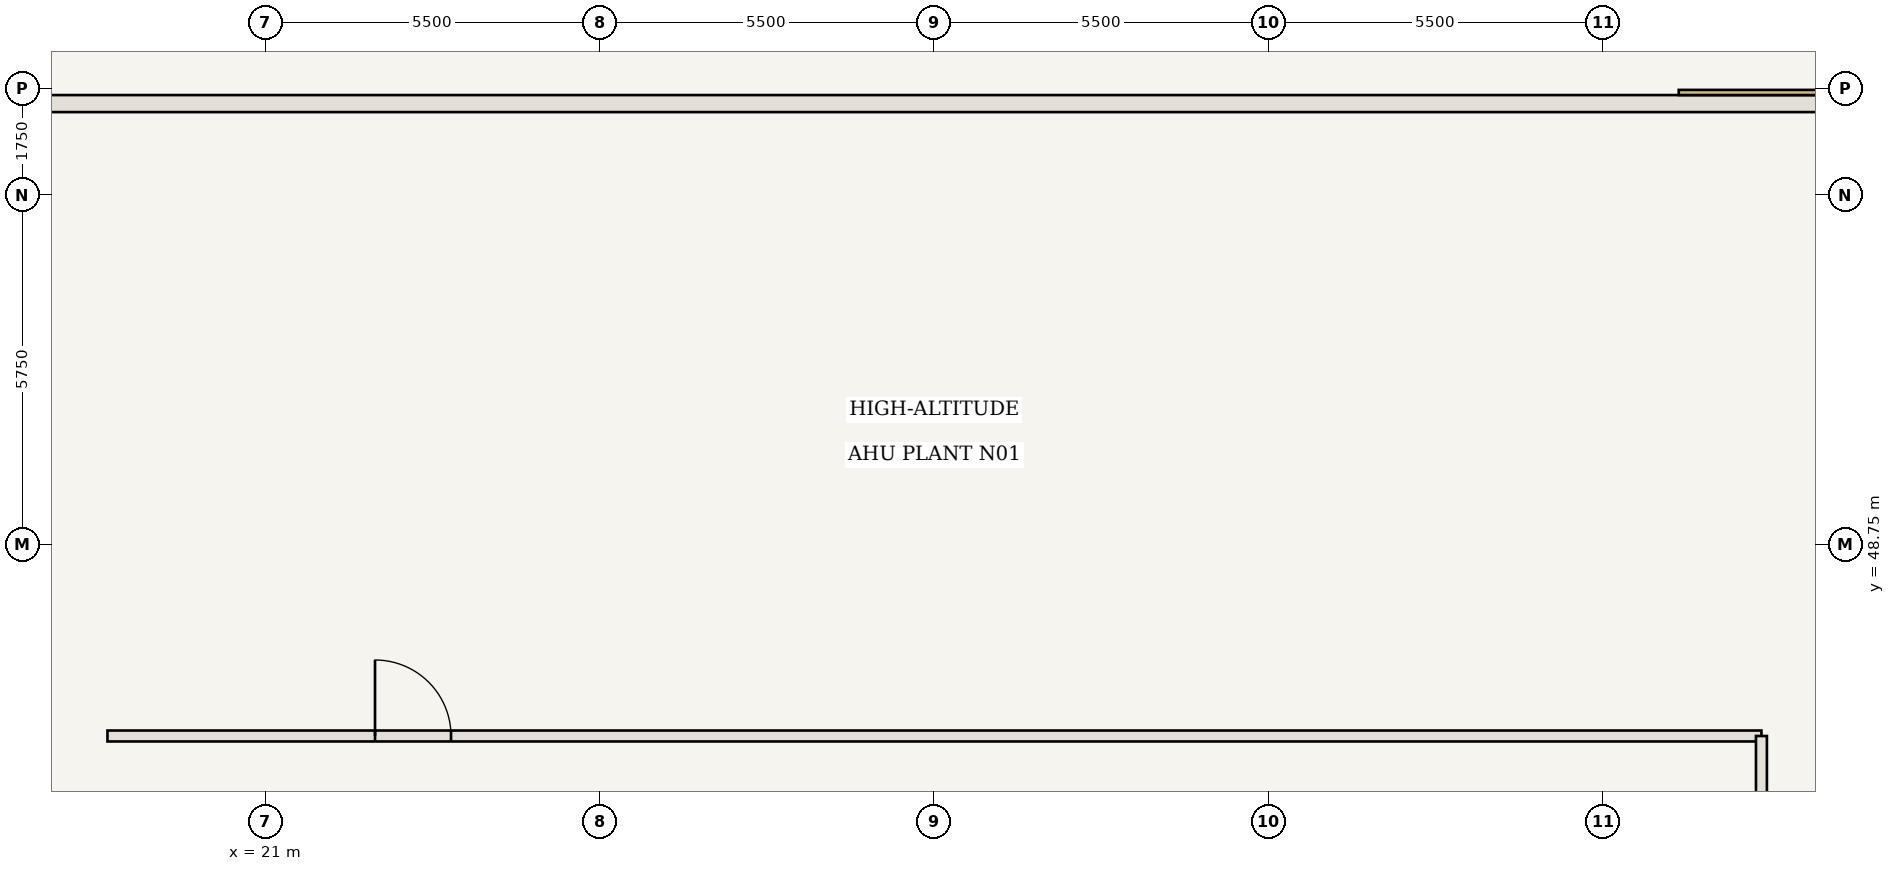
"""IFC4 building model, lengths in metres.
Left out: names, types, materials, properties, quantities, classifications, styles, units other than length and angle.
Written with IfcOpenShell. Run it as: python <this file> out.ifc"""

import sys

from ifc_helpers import new_model, si_unit, direction, frame, frame_2d, origin, place, context, subcontext, project, spatial, rectangle, extrude, element, fill, save


model = new_model("IFC4")
c1 = context("Model", 3, precision=1e-05, world=origin(), true_north=direction((0.0, 1.0)))
c2 = subcontext(c1, "Body", "Model", "MODEL_VIEW")
j1 = project(units=[si_unit("LENGTHUNIT", "METRE"), si_unit("PLANEANGLEUNIT", "RADIAN")], contexts=[c1])
p1 = place(None, origin())
s1 = spatial("IfcSite", under=j1, at=p1, CompositionType="ELEMENT")
p2 = place(p1, origin())
s2 = spatial("IfcBuilding", under=s1, at=p2, CompositionType="ELEMENT")
p3 = place(p2, frame((0.0, 0.0, 77.35)))
s3 = spatial("IfcBuildingStorey", under=s2, at=p3, CompositionType="ELEMENT", Elevation=77.35)
p4 = place(p3, frame((18.4, 45.6, 0.0), z_axis=(0.0, 0.0, 1.0), x_axis=(1.0, 0.0, 0.0)))
e1 = element("IfcWall", 1, at=p4, inside=s3, PredefinedType="STANDARD", context=c2, shape_type="SweptSolid", body=[
    extrude(rectangle(XDim=27.2, YDim=0.18, at=frame_2d((13.6, 0.0))), origin(), (0.0, 0.0, 1.0), 4.72),
])
p5 = place(p4, frame((4.4, 0.0, 0.0)))
e2 = element("IfcOpeningElement", 2, at=p5, cuts=e1, PredefinedType="OPENING", context=c2, shape_type="SweptSolid", body=[
    extrude(rectangle(XDim=1.25, YDim=2.2, at=frame_2d((0.625, 1.1))), frame((0.0, 0.1, 0.0), z_axis=(0.0, -1.0, 0.0), x_axis=(1.0, 0.0, 0.0)), (0.0, 0.0, 1.0), 0.2),
])
p6 = place(p3, frame((45.6, 18.4, 0.0), z_axis=(0.0, 0.0, 1.0), x_axis=(0.0, 1.0, 0.0)))
e3 = element("IfcWall", 3, at=p6, inside=s3, PredefinedType="STANDARD", context=c2, shape_type="SweptSolid", body=[
    extrude(rectangle(XDim=27.2, YDim=0.18, at=frame_2d((13.6, 0.0))), origin(), (0.0, 0.0, 1.0), 4.72),
])
p7 = place(p6, frame((14.55, 0.0, 0.0)))
e4 = element("IfcOpeningElement", 4, at=p7, cuts=e3, PredefinedType="OPENING", context=c2, shape_type="SweptSolid", body=[
    extrude(rectangle(XDim=1.25, YDim=2.2, at=frame_2d((0.625, 1.1))), frame((0.0, 0.1, 0.0), z_axis=(0.0, -1.0, 0.0), x_axis=(1.0, 0.0, 0.0)), (0.0, 0.0, 1.0), 0.2),
])
p8 = place(p3, frame((8.0, 56.0, 0.0), z_axis=(0.0, 0.0, 1.0), x_axis=(1.0, 0.0, 0.0)))
e5 = element("IfcWall", 5, at=p8, inside=s3, PredefinedType="USERDEFINED", context=c2, shape_type="SweptSolid", body=[
    extrude(rectangle(XDim=48.0, YDim=0.28, at=frame_2d((24.0, 0.0))), origin(), (0.0, 0.0, 1.0), 3.92),
])
p9 = place(p5, origin())
e6 = element("IfcDoor", 6, at=p9, inside=s3, OperationType="SINGLE_SWING_LEFT", PredefinedType="DOOR", context=c2, shape_type="SweptSolid", body=[
    extrude(rectangle(XDim=1.25, YDim=2.2, at=frame_2d((0.625, 1.1))), frame((0.0, 0.025, 0.0), z_axis=(0.0, -1.0, 0.0), x_axis=(1.0, 0.0, 0.0)), (0.0, 0.0, 1.0), 0.05),
])
fill(e2, e6)
save(model, sys.argv[1])
